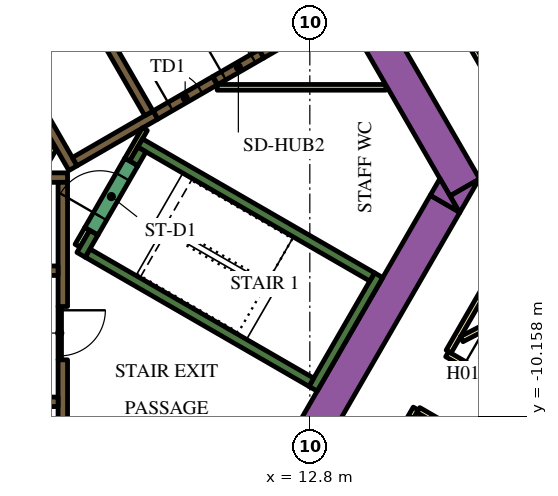
"""IFC4 building model, lengths in metres.
Left out: names, types, materials, properties, quantities, classifications, styles, units other than length and angle.
Written with IfcOpenShell. Run it as: python <this file> out.ifc"""

import sys

from ifc_helpers import new_model, si_unit, direction, frame, frame_2d, origin, place, context, subcontext, project, spatial, polyline, rectangle, outline, extrude, element, fill, save


model = new_model("IFC4")
c1 = context("Model", 3, precision=1e-05, world=origin(), true_north=direction((0.0, 1.0)))
c2 = subcontext(c1, "Body", "Model", "MODEL_VIEW")
j1 = project(units=[si_unit("LENGTHUNIT", "METRE"), si_unit("PLANEANGLEUNIT", "RADIAN")], contexts=[c1])
p1 = place(None, origin())
s1 = spatial("IfcSite", under=j1, at=p1, CompositionType="ELEMENT")
p2 = place(p1, origin())
s2 = spatial("IfcBuilding", under=s1, at=p2, CompositionType="ELEMENT")
p3 = place(p2, frame((0.0, 0.0, 27.6)))
s3 = spatial("IfcBuildingStorey", under=s2, at=p3, CompositionType="ELEMENT", Elevation=27.6)
p4 = place(p3, frame((6.776, 13.364, 0.0), z_axis=(0.0, 0.0, 1.0), x_axis=(0.500004177138, -0.8660229921, 0.0)))
e1 = element("IfcWall", 1, at=p4, inside=s3, PredefinedType="SOLIDWALL", context=c2, shape_type="SweptSolid", body=[
    extrude(rectangle(XDim=20.204, YDim=0.9, at=frame_2d((10.102, 0.0))), origin(), (0.0, 0.0, 1.0), 3.9),
])
p5 = place(p3, origin())
e2 = element("IfcWall", 2, at=p5, inside=s3, PredefinedType="SOLIDWALL", context=c2, shape_type="SweptSolid", body=[
    extrude(outline(polyline([(16.743, -4.8), (16.489, -4.36), (17.251, -3.92), (16.743, -4.8)])), origin(), (0.0, 0.0, 1.0), 3.9),
])
p6 = place(p3, frame((11.695, -12.644, 0.0), z_axis=(0.0, 0.0, 1.0), x_axis=(0.500010229568, 0.86601949766, 0.0)))
e3 = element("IfcWall", 3, at=p6, inside=s3, PredefinedType="SOLIDWALL", context=c2, shape_type="SweptSolid", body=[
    extrude(rectangle(XDim=9.326, YDim=0.9, at=frame_2d((4.663, 0.0))), origin(), (0.0, 0.0, 1.0), 3.9),
])
e4 = element("IfcWall", 4, at=p5, inside=s3, PredefinedType="SOLIDWALL", context=c2, shape_type="SweptSolid", body=[
    extrude(outline(polyline([(16.223, -3.9), (16.732, -4.78), (15.969, -4.34), (16.223, -3.9)])), origin(), (0.0, 0.0, 1.0), 3.9),
])
p7 = place(p3, frame((12.885, -9.431, 0.0), z_axis=(0.0, 0.0, 1.0), x_axis=(0.500020560727, 0.866013532718, 0.0)))
e5 = element("IfcWall", 5, at=p7, inside=s3, PredefinedType="SOLIDWALL", context=c2, shape_type="SweptSolid", body=[
    extrude(rectangle(XDim=3.45, YDim=0.25, at=frame_2d((1.725, 0.0))), origin(), (0.0, 0.0, 1.0), 3.9),
])
p8 = place(p3, frame((12.84, -9.261, 0.0), z_axis=(0.0, 0.0, 1.0), x_axis=(-0.866013990052, 0.500019768644, 0.0)))
e6 = element("IfcWall", 6, at=p8, inside=s3, PredefinedType="SOLIDWALL", context=c2, shape_type="SweptSolid", body=[
    extrude(rectangle(XDim=6.8, YDim=0.25, at=frame_2d((3.4, 0.0))), origin(), (0.0, 0.0, 1.0), 3.9),
])
p9 = place(p3, frame((6.78, -5.906, 0.0), z_axis=(0.0, 0.0, 1.0), x_axis=(0.500223362819, 0.865896406789, 0.0)))
e7 = element("IfcWall", 7, at=p9, inside=s3, PredefinedType="SOLIDWALL", context=c2, shape_type="SweptSolid", body=[
    extrude(rectangle(XDim=0.675, YDim=0.25, at=frame_2d((0.337, 0.0))), origin(), (0.0, 0.0, 1.0), 3.9),
])
p10 = place(p3, frame((8.334, -2.964, 0.0), z_axis=(0.0, 0.0, 1.0), x_axis=(0.866016039709, -0.500016218704, 0.0)))
e8 = element("IfcWall", 8, at=p10, inside=s3, PredefinedType="SOLIDWALL", context=c2, shape_type="SweptSolid", body=[
    extrude(rectangle(XDim=7.05, YDim=0.25, at=frame_2d((3.525, 0.0))), origin(), (0.0, 0.0, 1.0), 3.9),
])
p11 = place(p3, frame((8.168, -3.503, 0.0), z_axis=(0.0, 0.0, 1.0), x_axis=(0.49972245349, 0.866185586049, 0.0)))
e9 = element("IfcWall", 9, at=p11, inside=s3, PredefinedType="SOLIDWALL", context=c2, shape_type="SweptSolid", body=[
    extrude(rectangle(XDim=0.425, YDim=0.25, at=frame_2d((0.212, 0.0))), origin(), (0.0, 0.0, 1.0), 3.9),
])
p12 = place(p3, frame((-5.545, -3.875, 0.0), z_axis=(0.0, 0.0, 1.0), x_axis=(1.0, 0.0, 0.0)))
e10 = element("IfcWall", 10, at=p12, inside=s3, PredefinedType="SOLIDWALL", context=c2, shape_type="SweptSolid", body=[
    extrude(rectangle(XDim=11.97, YDim=0.25, at=frame_2d((5.985, 0.0))), origin(), (0.0, 0.0, 1.0), 3.9),
])
p13 = place(p3, frame((6.3, -8.67, 0.0), z_axis=(0.0, 0.0, 1.0), x_axis=(0.0, -1.0, 0.0)))
e11 = element("IfcWall", 11, at=p13, inside=s3, PredefinedType="SOLIDWALL", context=c2, shape_type="SweptSolid", body=[
    extrude(rectangle(XDim=3.43, YDim=0.25, at=frame_2d((1.715, 0.0))), origin(), (0.0, 0.0, 1.0), 3.9),
])
p14 = place(p3, frame((6.3, -7.268, 0.0), z_axis=(0.0, 0.0, 1.0), x_axis=(0.0, 1.0, 0.0)))
e12 = element("IfcWall", 12, at=p14, inside=s3, PredefinedType="SOLIDWALL", context=c2, shape_type="SweptSolid", body=[
    extrude(rectangle(XDim=3.268, YDim=0.25, at=frame_2d((1.634, 0.0))), origin(), (0.0, 0.0, 1.0), 3.9),
])
p15 = place(p3, frame((13.629, 0.594, 0.0), z_axis=(0.0, 0.0, 1.0), x_axis=(-0.866063384774, -0.499934209226, 0.0)))
e13 = element("IfcWall", 13, at=p15, inside=s3, PredefinedType="SOLIDWALL", context=c2, shape_type="SweptSolid", body=[
    extrude(rectangle(XDim=2.428, YDim=0.25, at=frame_2d((1.214, 0.0))), origin(), (0.0, 0.0, 1.0), 3.9),
])
e14 = element("IfcWall", 14, at=p5, inside=s3, PredefinedType="SOLIDWALL", context=c2, shape_type="SweptSolid", body=[
    extrude(outline(polyline([(0.566, 6.725), (0.566, 6.875), (0.566, 6.875), (0.565, 6.875), (0.361, 6.875), (0.035, 7.439), (0.252, 7.564), (0.377, 7.348), (6.552, -3.348), (6.677, -3.564), (6.46, -3.689), (0.448, 6.725), (0.565, 6.725), (0.566, 6.725), (0.566, 6.725)])), origin(), (0.0, 0.0, 1.0), 3.9),
])
p16 = place(p3, frame((6.614, -3.456, 0.0), z_axis=(0.0, 0.0, 1.0), x_axis=(0.866031582473, 0.499989298045, 0.0)))
e15 = element("IfcWall", 15, at=p16, inside=s3, PredefinedType="SOLIDWALL", context=c2, shape_type="SweptSolid", body=[
    extrude(rectangle(XDim=2.455, YDim=0.25, at=frame_2d((1.228, 0.0))), origin(), (0.0, 0.0, 1.0), 3.9),
])
p17 = place(p3, frame((6.945, -5.222, 0.0), z_axis=(0.0, 0.0, 1.0), x_axis=(-0.499818422106, -0.866130212453, 0.0)))
e16 = element("IfcWall", 16, at=p17, inside=s3, PredefinedType="PARTITIONING", context=c2, shape_type="SweptSolid", body=[
    extrude(rectangle(XDim=0.514, YDim=0.15, at=frame_2d((0.257, 0.0))), origin(), (0.0, 0.0, 1.0), 2.75),
])
p18 = place(p3, frame((5.705, -3.718, 0.0), z_axis=(0.0, 0.0, 1.0), x_axis=(0.499962090823, 0.866047289552, 0.0)))
e17 = element("IfcWall", 17, at=p18, inside=s3, PredefinedType="PARTITIONING", context=c2, shape_type="SweptSolid", body=[
    extrude(rectangle(XDim=0.735, YDim=0.15, at=frame_2d((0.367, 0.0))), origin(), (0.0, 0.0, 1.0), 2.75),
])
p19 = place(p3, frame((8.459, -2.599, 0.0), z_axis=(0.0, 0.0, 1.0), x_axis=(-0.500041054325, -0.866001699761, 0.0)))
e18 = element("IfcWall", 18, at=p19, inside=s3, PredefinedType="PARTITIONING", context=c2, shape_type="SweptSolid", body=[
    extrude(rectangle(XDim=0.929, YDim=0.15, at=frame_2d((0.464, 0.0))), origin(), (0.0, 0.0, 1.0), 3.9),
])
p20 = place(p3, frame((10.362, -1.5, 0.0), z_axis=(0.0, 0.0, 1.0), x_axis=(1.0, 0.0, 0.0)))
e19 = element("IfcWall", 19, at=p20, inside=s3, PredefinedType="PARTITIONING", context=c2, shape_type="SweptSolid", body=[
    extrude(rectangle(XDim=4.439, YDim=0.15, at=frame_2d((2.22, 0.0))), origin(), (0.0, 0.0, 1.0), 2.75),
])
p21 = place(p3, frame((-6.175, -9.775, 0.0), z_axis=(0.0, 0.0, 1.0), x_axis=(1.0, 0.0, 0.0)))
e20 = element("IfcWall", 20, at=p21, inside=s3, PredefinedType="SOLIDWALL", context=c2, shape_type="SweptSolid", body=[
    extrude(rectangle(XDim=12.35, YDim=0.25, at=frame_2d((6.175, 0.0))), origin(), (0.0, 0.0, 1.0), 3.9),
])
p22 = place(p21, frame((0.585, 0.0, 0.0)))
e21 = element("IfcOpeningElement", 21, at=p22, cuts=e20, PredefinedType="OPENING", context=c2, shape_type="SweptSolid", body=[
    extrude(rectangle(XDim=1.1, YDim=2.1, at=frame_2d((0.55, 1.05))), frame((0.0, 0.135, 0.0), z_axis=(0.0, -1.0, 0.0), x_axis=(1.0, 0.0, 0.0)), (0.0, 0.0, 1.0), 0.27),
])
p23 = place(p21, frame((3.105, 0.0, 0.0)))
e22 = element("IfcOpeningElement", 22, at=p23, cuts=e20, PredefinedType="OPENING", context=c2, shape_type="SweptSolid", body=[
    extrude(rectangle(XDim=1.1, YDim=2.1, at=frame_2d((0.55, 1.05))), frame((0.0, 0.135, 0.0), z_axis=(0.0, -1.0, 0.0), x_axis=(1.0, 0.0, 0.0)), (0.0, 0.0, 1.0), 0.27),
])
p24 = place(p21, frame((5.625, 0.0, 0.0)))
e23 = element("IfcOpeningElement", 23, at=p24, cuts=e20, PredefinedType="OPENING", context=c2, shape_type="SweptSolid", body=[
    extrude(rectangle(XDim=1.1, YDim=2.1, at=frame_2d((0.55, 1.05))), frame((0.0, 0.135, 0.0), z_axis=(0.0, -1.0, 0.0), x_axis=(1.0, 0.0, 0.0)), (0.0, 0.0, 1.0), 0.27),
])
p25 = place(p21, frame((8.145, 0.0, 0.0)))
e24 = element("IfcOpeningElement", 24, at=p25, cuts=e20, PredefinedType="OPENING", context=c2, shape_type="SweptSolid", body=[
    extrude(rectangle(XDim=1.1, YDim=2.1, at=frame_2d((0.55, 1.05))), frame((0.0, 0.135, 0.0), z_axis=(0.0, -1.0, 0.0), x_axis=(1.0, 0.0, 0.0)), (0.0, 0.0, 1.0), 0.27),
])
p26 = place(p21, frame((10.665, 0.0, 0.0)))
e25 = element("IfcOpeningElement", 25, at=p26, cuts=e20, PredefinedType="OPENING", context=c2, shape_type="SweptSolid", body=[
    extrude(rectangle(XDim=1.1, YDim=2.1, at=frame_2d((0.55, 1.05))), frame((0.0, 0.135, 0.0), z_axis=(0.0, -1.0, 0.0), x_axis=(1.0, 0.0, 0.0)), (0.0, 0.0, 1.0), 0.27),
])
p27 = place(p3, frame((-6.175, -6.325, 0.0), z_axis=(0.0, 0.0, 1.0), x_axis=(1.0, 0.0, 0.0)))
e26 = element("IfcWall", 26, at=p27, inside=s3, PredefinedType="SOLIDWALL", context=c2, shape_type="SweptSolid", body=[
    extrude(rectangle(XDim=12.35, YDim=0.25, at=frame_2d((6.175, 0.0))), origin(), (0.0, 0.0, 1.0), 3.9),
])
p28 = place(p27, frame((3.205, 0.0, 0.0)))
e27 = element("IfcOpeningElement", 27, at=p28, cuts=e26, PredefinedType="OPENING", context=c2, shape_type="SweptSolid", body=[
    extrude(rectangle(XDim=0.9, YDim=2.1, at=frame_2d((0.45, 1.05))), frame((0.0, 0.135, 0.0), z_axis=(0.0, -1.0, 0.0), x_axis=(1.0, 0.0, 0.0)), (0.0, 0.0, 1.0), 0.27),
])
p29 = place(p27, frame((8.145, 0.0, 0.0)))
e28 = element("IfcOpeningElement", 28, at=p29, cuts=e26, PredefinedType="OPENING", context=c2, shape_type="SweptSolid", body=[
    extrude(rectangle(XDim=1.1, YDim=2.1, at=frame_2d((0.55, 1.05))), frame((0.0, 0.135, 0.0), z_axis=(0.0, -1.0, 0.0), x_axis=(1.0, 0.0, 0.0)), (0.0, 0.0, 1.0), 0.27),
])
p30 = place(p27, frame((10.665, 0.0, 0.0)))
e29 = element("IfcOpeningElement", 29, at=p30, cuts=e26, PredefinedType="OPENING", context=c2, shape_type="SweptSolid", body=[
    extrude(rectangle(XDim=1.1, YDim=2.1, at=frame_2d((0.55, 1.05))), frame((0.0, 0.135, 0.0), z_axis=(0.0, -1.0, 0.0), x_axis=(1.0, 0.0, 0.0)), (0.0, 0.0, 1.0), 0.27),
])
p31 = place(p3, frame((8.565, -2.185, 0.0), z_axis=(0.0, 0.0, 1.0), x_axis=(-0.499997954832, 0.866026584559, 0.0)))
e30 = element("IfcWall", 30, at=p31, inside=s3, PredefinedType="SOLIDWALL", context=c2, shape_type="SweptSolid", body=[
    extrude(rectangle(XDim=12.35, YDim=0.25, at=frame_2d((6.175, 0.0))), origin(), (0.0, 0.0, 1.0), 3.9),
])
p32 = place(p31, frame((5.725, 0.0, 0.0)))
e31 = element("IfcOpeningElement", 31, at=p32, cuts=e30, PredefinedType="OPENING", context=c2, shape_type="SweptSolid", body=[
    extrude(rectangle(XDim=0.9, YDim=2.1, at=frame_2d((0.45, 1.05))), frame((0.0, 0.135, 0.0), z_axis=(0.0, -1.0, 0.0), x_axis=(1.0, 0.0, 0.0)), (0.0, 0.0, 1.0), 0.27),
])
p33 = place(p3, frame((7.053, -5.284, 0.0), z_axis=(0.0, 0.0, 1.0), x_axis=(0.500078061341, 0.865980330357, 0.0)))
e32 = element("IfcWall", 32, at=p33, inside=s3, PredefinedType="SOLIDWALL", context=c2, shape_type="SweptSolid", body=[
    extrude(rectangle(XDim=2.1, YDim=0.4, at=frame_2d((1.05, 0.0))), origin(), (0.0, 0.0, 1.0), 3.9),
])
p34 = place(p33, frame((0.45, 0.0, 0.0)))
e33 = element("IfcOpeningElement", 33, at=p34, cuts=e32, PredefinedType="OPENING", context=c2, shape_type="SweptSolid", body=[
    extrude(rectangle(XDim=1.2, YDim=2.1, at=frame_2d((0.6, 1.05))), frame((0.0, 0.21, 0.0), z_axis=(0.0, -1.0, 0.0), x_axis=(1.0, 0.0, 0.0)), (0.0, 0.0, 1.0), 0.42),
])
p35 = place(p3, frame((8.74, -2.229, 0.0), z_axis=(0.0, 0.0, 1.0), x_axis=(0.865989075817, 0.500062916607, 0.0)))
e34 = element("IfcWall", 34, at=p35, inside=s3, PredefinedType="SOLIDWALL", context=c2, shape_type="SweptSolid", body=[
    extrude(rectangle(XDim=1.8, YDim=0.25, at=frame_2d((0.9, 0.0))), origin(), (0.0, 0.0, 1.0), 3.9),
])
p36 = place(p35, frame((0.45, 0.0, 0.0)))
e35 = element("IfcOpeningElement", 35, at=p36, cuts=e34, PredefinedType="OPENING", context=c2, shape_type="SweptSolid", body=[
    extrude(rectangle(XDim=0.9, YDim=2.1, at=frame_2d((0.45, 1.05))), frame((0.0, 0.135, 0.0), z_axis=(0.0, -1.0, 0.0), x_axis=(1.0, 0.0, 0.0)), (0.0, 0.0, 1.0), 0.27),
])
p37 = place(p3, frame((6.22, -7.266, 0.0), z_axis=(0.0, 0.0, 1.0), x_axis=(0.0, -1.0, 0.0)))
e36 = element("IfcWall", 36, at=p37, inside=s3, PredefinedType="PARTITIONING", context=c2, shape_type="SweptSolid", body=[
    extrude(rectangle(XDim=1.4, YDim=0.09, at=frame_2d((0.7, 0.0))), origin(), (0.0, 0.0, 1.0), 2.75),
])
p38 = place(p37, frame((0.1, 0.0, 0.0)))
e37 = element("IfcOpeningElement", 37, at=p38, cuts=e36, PredefinedType="OPENING", context=c2, shape_type="SweptSolid", body=[
    extrude(rectangle(XDim=1.2, YDim=2.1, at=frame_2d((0.6, 1.05))), frame((0.0, 0.055, 0.0), z_axis=(0.0, -1.0, 0.0), x_axis=(1.0, 0.0, 0.0)), (0.0, 0.0, 1.0), 0.11),
])
p39 = place(p3, frame((10.313, -1.32, 0.0), z_axis=(0.0, 0.0, 1.0), x_axis=(0.866034573852, 0.49998411664, 0.0)))
e38 = element("IfcWall", 38, at=p39, inside=s3, PredefinedType="SOLIDWALL", context=c2, shape_type="SweptSolid", body=[
    extrude(rectangle(XDim=1.4, YDim=0.25, at=frame_2d((0.7, 0.0))), origin(), (0.0, 0.0, 1.0), 3.9),
])
p40 = place(p39, frame((0.25, 0.0, 0.0)))
e39 = element("IfcOpeningElement", 39, at=p40, cuts=e38, PredefinedType="OPENING", context=c2, shape_type="SweptSolid", body=[
    extrude(rectangle(XDim=0.9, YDim=2.1, at=frame_2d((0.45, 1.05))), frame((0.0, 0.135, 0.0), z_axis=(0.0, -1.0, 0.0), x_axis=(1.0, 0.0, 0.0)), (0.0, 0.0, 1.0), 0.27),
])
p41 = place(p3, frame((16.412, -8.523, 0.0), z_axis=(0.0, 0.0, 1.0), x_axis=(0.866022197818, -0.500005552856, 0.0)))
e40 = element("IfcWall", 40, at=p41, inside=s3, PredefinedType="PARTITIONING", context=c2, shape_type="SweptSolid", body=[
    extrude(rectangle(XDim=16.224, YDim=0.15, at=frame_2d((8.112, 0.0))), origin(), (0.0, 0.0, 1.0), 2.75),
])
p42 = place(p41, frame((7.949, 0.0, 0.0)))
e41 = element("IfcOpeningElement", 41, at=p42, cuts=e40, PredefinedType="OPENING", context=c2, shape_type="SweptSolid", body=[
    extrude(rectangle(XDim=1.0, YDim=2.1, at=frame_2d((0.5, 1.05))), frame((0.0, 0.085, 0.0), z_axis=(0.0, -1.0, 0.0), x_axis=(1.0, 0.0, 0.0)), (0.0, 0.0, 1.0), 0.17),
])
p43 = place(p41, frame((0.526, 0.0, 0.0)))
e42 = element("IfcOpeningElement", 42, at=p43, cuts=e40, PredefinedType="OPENING", context=c2, shape_type="SweptSolid", body=[
    extrude(rectangle(XDim=1.0, YDim=2.1, at=frame_2d((0.5, 1.05))), frame((0.0, 0.085, 0.0), z_axis=(0.0, -1.0, 0.0), x_axis=(1.0, 0.0, 0.0)), (0.0, 0.0, 1.0), 0.17),
])
p44 = place(p3, frame((19.081, -3.9, 0.0), z_axis=(0.0, 0.0, 1.0), x_axis=(-0.499974327079, -0.866040225545, 0.0)))
e43 = element("IfcWall", 43, at=p44, inside=s3, PredefinedType="PARTITIONING", context=c2, shape_type="SweptSolid", body=[
    extrude(rectangle(XDim=5.258, YDim=0.15, at=frame_2d((2.629, 0.0))), origin(), (0.0, 0.0, 1.0), 2.75),
])
p45 = place(p3, frame((6.163, 18.475, 0.0), z_axis=(0.0, 0.0, 1.0), x_axis=(0.500001317485, -0.866024643133, 0.0)))
e44 = element("IfcWall", 44, at=p45, inside=s3, PredefinedType="PARTITIONING", context=c2, shape_type="SweptSolid", body=[
    extrude(rectangle(XDim=25.767, YDim=0.15, at=frame_2d((12.883, 0.0))), origin(), (0.0, 0.0, 1.0), 2.75),
])
p46 = place(p45, frame((24.586, 0.0, 0.0)))
e45 = element("IfcOpeningElement", 45, at=p46, cuts=e44, PredefinedType="OPENING", context=c2, shape_type="SweptSolid", body=[
    extrude(rectangle(XDim=1.0, YDim=2.1, at=frame_2d((0.5, 1.05))), frame((0.0, 0.085, 0.0), z_axis=(0.0, -1.0, 0.0), x_axis=(1.0, 0.0, 0.0)), (0.0, 0.0, 1.0), 0.17),
])
p47 = place(p45, frame((19.319, 0.0, 0.0)))
e46 = element("IfcOpeningElement", 46, at=p47, cuts=e44, PredefinedType="OPENING", context=c2, shape_type="SweptSolid", body=[
    extrude(rectangle(XDim=1.0, YDim=2.1, at=frame_2d((0.5, 1.05))), frame((0.0, 0.085, 0.0), z_axis=(0.0, -1.0, 0.0), x_axis=(1.0, 0.0, 0.0)), (0.0, 0.0, 1.0), 0.17),
])
p48 = place(p45, frame((18.012, 0.0, 0.0)))
e47 = element("IfcOpeningElement", 47, at=p48, cuts=e44, PredefinedType="OPENING", context=c2, shape_type="SweptSolid", body=[
    extrude(rectangle(XDim=1.0, YDim=2.1, at=frame_2d((0.5, 1.05))), frame((0.0, 0.085, 0.0), z_axis=(0.0, -1.0, 0.0), x_axis=(1.0, 0.0, 0.0)), (0.0, 0.0, 1.0), 0.17),
])
p49 = place(p45, frame((6.824, 0.0, 0.0)))
e48 = element("IfcOpeningElement", 48, at=p49, cuts=e44, PredefinedType="OPENING", context=c2, shape_type="SweptSolid", body=[
    extrude(rectangle(XDim=1.1, YDim=2.1, at=frame_2d((0.55, 1.05))), frame((0.0, 0.085, 0.0), z_axis=(0.0, -1.0, 0.0), x_axis=(1.0, 0.0, 0.0)), (0.0, 0.0, 1.0), 0.17),
])
p50 = place(p45, frame((4.658, 0.0, 0.0)))
e49 = element("IfcOpeningElement", 49, at=p50, cuts=e44, PredefinedType="OPENING", context=c2, shape_type="SweptSolid", body=[
    extrude(rectangle(XDim=0.9, YDim=2.1, at=frame_2d((0.45, 1.05))), frame((0.0, 0.085, 0.0), z_axis=(0.0, -1.0, 0.0), x_axis=(1.0, 0.0, 0.0)), (0.0, 0.0, 1.0), 0.17),
])
p51 = place(p45, frame((0.18, 0.0, 0.0)))
e50 = element("IfcOpeningElement", 50, at=p51, cuts=e44, PredefinedType="OPENING", context=c2, shape_type="SweptSolid", body=[
    extrude(rectangle(XDim=1.0, YDim=2.1, at=frame_2d((0.5, 1.05))), frame((0.0, 0.085, 0.0), z_axis=(0.0, -1.0, 0.0), x_axis=(1.0, 0.0, 0.0)), (0.0, 0.0, 1.0), 0.17),
])
p52 = place(p3, frame((15.587, -9.952, 0.0), z_axis=(0.0, 0.0, 1.0), x_axis=(-0.500016618951, -0.866015808616, 0.0)))
e51 = element("IfcWall", 51, at=p52, inside=s3, PredefinedType="PARTITIONING", context=c2, shape_type="SweptSolid", body=[
    extrude(rectangle(XDim=5.268, YDim=0.15, at=frame_2d((2.634, 0.0))), origin(), (0.0, 0.0, 1.0), 2.75),
])
p53 = place(p52, frame((0.225, 0.0, 0.0)))
e52 = element("IfcOpeningElement", 52, at=p53, cuts=e51, PredefinedType="OPENING", context=c2, shape_type="SweptSolid", body=[
    extrude(rectangle(XDim=1.0, YDim=2.1, at=frame_2d((0.5, 1.05))), frame((0.0, 0.085, 0.0), z_axis=(0.0, -1.0, 0.0), x_axis=(1.0, 0.0, 0.0)), (0.0, 0.0, 1.0), 0.17),
])
p54 = place(p3, frame((29.638, -18.064, 0.0), z_axis=(0.0, 0.0, 1.0), x_axis=(-0.866026175601, 0.499998663172, 0.0)))
e53 = element("IfcWall", 53, at=p54, inside=s3, PredefinedType="PARTITIONING", context=c2, shape_type="SweptSolid", body=[
    extrude(rectangle(XDim=16.144, YDim=0.15, at=frame_2d((8.072, 0.0))), origin(), (0.0, 0.0, 1.0), 2.75),
])
p55 = place(p54, frame((11.004, 0.0, 0.0)))
e54 = element("IfcOpeningElement", 54, at=p55, cuts=e53, PredefinedType="OPENING", context=c2, shape_type="SweptSolid", body=[
    extrude(rectangle(XDim=1.0, YDim=2.1, at=frame_2d((0.5, 1.05))), frame((0.0, 0.085, 0.0), z_axis=(0.0, -1.0, 0.0), x_axis=(1.0, 0.0, 0.0)), (0.0, 0.0, 1.0), 0.17),
])
p56 = place(p54, frame((7.275, 0.0, 0.0)))
e55 = element("IfcOpeningElement", 55, at=p56, cuts=e53, PredefinedType="OPENING", context=c2, shape_type="SweptSolid", body=[
    extrude(rectangle(XDim=1.0, YDim=2.1, at=frame_2d((0.5, 1.05))), frame((0.0, 0.085, 0.0), z_axis=(0.0, -1.0, 0.0), x_axis=(1.0, 0.0, 0.0)), (0.0, 0.0, 1.0), 0.17),
])
p57 = place(p3, frame((27.134, -2.779, 0.0), z_axis=(0.0, 0.0, 1.0), x_axis=(-0.8882049501, -0.459447457951, 0.0)))
e56 = element("IfcWall", 56, at=p57, inside=s3, PredefinedType="PARTITIONING", context=c2, shape_type="SweptSolid", body=[
    extrude(rectangle(XDim=11.638, YDim=0.15, at=frame_2d((5.819, 0.0))), origin(), (0.0, 0.0, 1.0), 2.75),
])
p58 = place(p34, origin())
e57 = element("IfcDoor", 57, at=p58, inside=s3, OperationType="SINGLE_SWING_LEFT", PredefinedType="DOOR", context=c2, shape_type="SweptSolid", body=[
    extrude(rectangle(XDim=1.2, YDim=2.1, at=frame_2d((0.6, 1.05))), frame((0.0, 0.025, 0.0), z_axis=(0.0, -1.0, 0.0), x_axis=(1.0, 0.0, 0.0)), (0.0, 0.0, 1.0), 0.05),
])
fill(e33, e57)
p59 = place(p36, origin())
e58 = element("IfcDoor", 58, at=p59, inside=s3, OperationType="SINGLE_SWING_LEFT", PredefinedType="DOOR", context=c2, shape_type="SweptSolid", body=[
    extrude(rectangle(XDim=0.9, YDim=2.1, at=frame_2d((0.45, 1.05))), frame((0.0, 0.025, 0.0), z_axis=(0.0, -1.0, 0.0), x_axis=(1.0, 0.0, 0.0)), (0.0, 0.0, 1.0), 0.05),
])
fill(e35, e58)
p60 = place(p38, origin())
e59 = element("IfcDoor", 59, at=p60, inside=s3, OperationType="SINGLE_SWING_LEFT", PredefinedType="DOOR", context=c2, shape_type="SweptSolid", body=[
    extrude(rectangle(XDim=1.2, YDim=2.1, at=frame_2d((0.6, 1.05))), frame((0.0, 0.025, 0.0), z_axis=(0.0, -1.0, 0.0), x_axis=(1.0, 0.0, 0.0)), (0.0, 0.0, 1.0), 0.05),
])
fill(e37, e59)
p61 = place(p40, origin())
e60 = element("IfcDoor", 60, at=p61, inside=s3, OperationType="SINGLE_SWING_LEFT", PredefinedType="DOOR", context=c2, shape_type="SweptSolid", body=[
    extrude(rectangle(XDim=0.9, YDim=2.1, at=frame_2d((0.45, 1.05))), frame((0.0, 0.025, 0.0), z_axis=(0.0, -1.0, 0.0), x_axis=(1.0, 0.0, 0.0)), (0.0, 0.0, 1.0), 0.05),
])
fill(e39, e60)
p62 = place(p53, origin())
e61 = element("IfcDoor", 61, at=p62, inside=s3, OperationType="SINGLE_SWING_LEFT", PredefinedType="DOOR", context=c2, shape_type="SweptSolid", body=[
    extrude(rectangle(XDim=1.0, YDim=2.1, at=frame_2d((0.5, 1.05))), frame((0.0, 0.025, 0.0), z_axis=(0.0, -1.0, 0.0), x_axis=(1.0, 0.0, 0.0)), (0.0, 0.0, 1.0), 0.05),
])
fill(e52, e61)
p63 = place(p43, origin())
e62 = element("IfcDoor", 62, at=p63, inside=s3, OperationType="SINGLE_SWING_LEFT", PredefinedType="DOOR", context=c2, shape_type="SweptSolid", body=[
    extrude(rectangle(XDim=1.0, YDim=2.1, at=frame_2d((0.5, 1.05))), frame((0.0, 0.025, 0.0), z_axis=(0.0, -1.0, 0.0), x_axis=(1.0, 0.0, 0.0)), (0.0, 0.0, 1.0), 0.05),
])
fill(e42, e62)
save(model, sys.argv[1])
